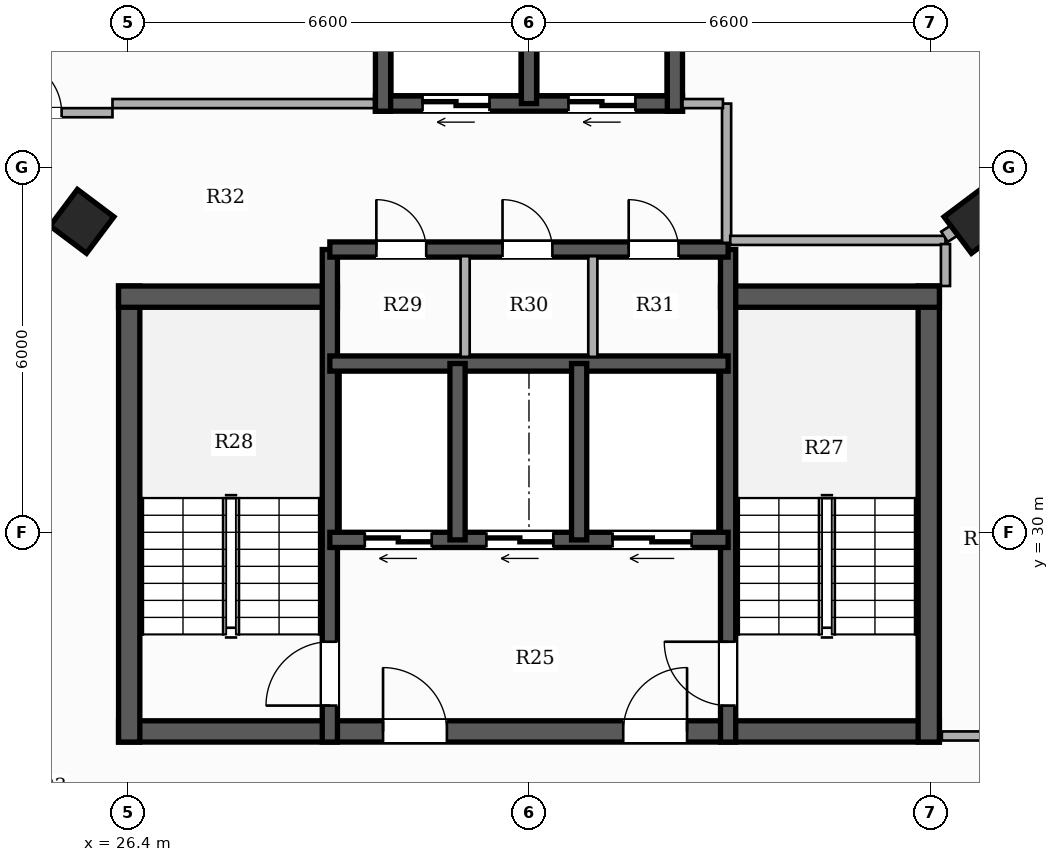
"""IFC4 building model, lengths in metres.
Left out: names, types, materials, properties, quantities, classifications, styles, units other than length and angle.
Written with IfcOpenShell. Run it as: python <this file> out.ifc"""

import sys

from ifc_helpers import new_model, si_unit, direction, frame, frame_2d, origin, origin_2d, place, context, subcontext, project, spatial, rectangle, hollow_rectangle, extrude, element, fill, save


model = new_model("IFC4")
c1 = context("Model", 3, precision=1e-05, world=origin(), true_north=direction((0.0, 1.0)))
c2 = subcontext(c1, "Body", "Model", "MODEL_VIEW")
j1 = project(units=[si_unit("LENGTHUNIT", "METRE"), si_unit("PLANEANGLEUNIT", "RADIAN")], contexts=[c1])
p1 = place(None, origin())
s1 = spatial("IfcSite", under=j1, at=p1, CompositionType="ELEMENT")
p2 = place(p1, origin())
s2 = spatial("IfcBuilding", under=s1, at=p2, CompositionType="ELEMENT")
p3 = place(p2, frame((0.0, 0.0, 209.6)))
s3 = spatial("IfcBuildingStorey", under=s2, at=p3, CompositionType="ELEMENT", Elevation=209.6)
p4 = place(p3, frame((26.25, 26.725, 0.0), z_axis=(0.0, 0.0, 1.0), x_axis=(1.0, 0.0, 0.0)))
e1 = element("IfcWall", 1, at=p4, inside=s3, PredefinedType="SHEAR", context=c2, shape_type="SweptSolid", body=[
    extrude(rectangle(XDim=13.5, YDim=0.35, at=frame_2d((6.75, 0.0))), origin(), (0.0, 0.0, 1.0), 3.3),
])
p5 = place(p4, frame((4.35, 0.0, 0.0)))
e2 = element("IfcOpeningElement", 2, at=p5, cuts=e1, PredefinedType="OPENING", context=c2, shape_type="SweptSolid", body=[
    extrude(rectangle(XDim=1.05, YDim=2.15, at=frame_2d((0.525, 1.075))), frame((0.0, 0.185, 0.0), z_axis=(0.0, -1.0, 0.0), x_axis=(1.0, 0.0, 0.0)), (0.0, 0.0, 1.0), 0.37),
])
p6 = place(p4, frame((8.3, 0.0, 0.0)))
e3 = element("IfcOpeningElement", 3, at=p6, cuts=e1, PredefinedType="OPENING", context=c2, shape_type="SweptSolid", body=[
    extrude(rectangle(XDim=1.05, YDim=2.15, at=frame_2d((0.525, 1.075))), frame((0.0, 0.185, 0.0), z_axis=(0.0, -1.0, 0.0), x_axis=(1.0, 0.0, 0.0)), (0.0, 0.0, 1.0), 0.37),
])
p7 = place(p3, frame((26.425, 26.55, 0.0), z_axis=(0.0, 0.0, 1.0), x_axis=(0.0, 1.0, 0.0)))
e4 = element("IfcWall", 4, at=p7, inside=s3, PredefinedType="SHEAR", context=c2, shape_type="SweptSolid", body=[
    extrude(rectangle(XDim=7.5, YDim=0.35, at=frame_2d((3.75, 0.0))), origin(), (0.0, 0.0, 1.0), 3.3),
])
p8 = place(p3, frame((26.25, 33.875, 0.0), z_axis=(0.0, 0.0, 1.0), x_axis=(1.0, 0.0, 0.0)))
e5 = element("IfcWall", 5, at=p8, inside=s3, PredefinedType="SHEAR", context=c2, shape_type="SweptSolid", body=[
    extrude(rectangle(XDim=3.6, YDim=0.35, at=frame_2d((1.8, 0.0))), origin(), (0.0, 0.0, 1.0), 3.3),
])
p9 = place(p3, frame((39.575, 26.55, 0.0), z_axis=(0.0, 0.0, 1.0), x_axis=(0.0, 1.0, 0.0)))
e6 = element("IfcWall", 6, at=p9, inside=s3, PredefinedType="SHEAR", context=c2, shape_type="SweptSolid", body=[
    extrude(rectangle(XDim=7.5, YDim=0.35, at=frame_2d((3.75, 0.0))), origin(), (0.0, 0.0, 1.0), 3.3),
])
p10 = place(p3, frame((36.15, 33.875, 0.0), z_axis=(0.0, 0.0, 1.0), x_axis=(1.0, 0.0, 0.0)))
e7 = element("IfcWall", 7, at=p10, inside=s3, PredefinedType="SHEAR", context=c2, shape_type="SweptSolid", body=[
    extrude(rectangle(XDim=3.6, YDim=0.35, at=frame_2d((1.8, 0.0))), origin(), (0.0, 0.0, 1.0), 3.3),
])
p11 = place(p3, frame((29.725, 26.55, 0.0), z_axis=(0.0, 0.0, 1.0), x_axis=(0.0, 1.0, 0.0)))
e8 = element("IfcWall", 8, at=p11, inside=s3, PredefinedType="SHEAR", context=c2, shape_type="SweptSolid", body=[
    extrude(rectangle(XDim=8.1, YDim=0.25, at=frame_2d((4.05, 0.0))), origin(), (0.0, 0.0, 1.0), 3.3),
])
p12 = place(p11, frame((0.6, 0.0, 0.0)))
e9 = element("IfcOpeningElement", 9, at=p12, cuts=e8, PredefinedType="OPENING", context=c2, shape_type="SweptSolid", body=[
    extrude(rectangle(XDim=1.05, YDim=2.15, at=frame_2d((0.525, 1.075))), frame((0.0, 0.135, 0.0), z_axis=(0.0, -1.0, 0.0), x_axis=(1.0, 0.0, 0.0)), (0.0, 0.0, 1.0), 0.27),
])
p13 = place(p3, frame((36.275, 26.55, 0.0), z_axis=(0.0, 0.0, 1.0), x_axis=(0.0, 1.0, 0.0)))
e10 = element("IfcWall", 10, at=p13, inside=s3, PredefinedType="SHEAR", context=c2, shape_type="SweptSolid", body=[
    extrude(rectangle(XDim=8.1, YDim=0.25, at=frame_2d((4.05, 0.0))), origin(), (0.0, 0.0, 1.0), 3.3),
])
p14 = place(p13, frame((0.6, 0.0, 0.0)))
e11 = element("IfcOpeningElement", 11, at=p14, cuts=e10, PredefinedType="OPENING", context=c2, shape_type="SweptSolid", body=[
    extrude(rectangle(XDim=1.05, YDim=2.15, at=frame_2d((0.525, 1.075))), frame((0.0, 0.135, 0.0), z_axis=(0.0, -1.0, 0.0), x_axis=(1.0, 0.0, 0.0)), (0.0, 0.0, 1.0), 0.27),
])
p15 = place(p3, frame((36.275, 29.875, 0.0), z_axis=(0.0, 0.0, 1.0), x_axis=(-1.0, 0.0, 0.0)))
e12 = element("IfcWall", 12, at=p15, inside=s3, PredefinedType="SHEAR", context=c2, shape_type="SweptSolid", body=[
    extrude(rectangle(XDim=6.55, YDim=0.25, at=frame_2d((3.275, 0.0))), origin(), (0.0, 0.0, 1.0), 3.3),
])
p16 = place(p15, frame((4.875, 0.0, 0.0)))
e13 = element("IfcOpeningElement", 13, at=p16, cuts=e12, PredefinedType="OPENING", context=c2, shape_type="SweptSolid", body=[
    extrude(rectangle(XDim=1.1, YDim=2.2, at=frame_2d((0.55, 1.1))), frame((0.0, 0.135, 0.0), z_axis=(0.0, -1.0, 0.0), x_axis=(1.0, 0.0, 0.0)), (0.0, 0.0, 1.0), 0.27),
])
p17 = place(p15, frame((2.875, 0.0, 0.0)))
e14 = element("IfcOpeningElement", 14, at=p17, cuts=e12, PredefinedType="OPENING", context=c2, shape_type="SweptSolid", body=[
    extrude(rectangle(XDim=1.1, YDim=2.2, at=frame_2d((0.55, 1.1))), frame((0.0, 0.135, 0.0), z_axis=(0.0, -1.0, 0.0), x_axis=(1.0, 0.0, 0.0)), (0.0, 0.0, 1.0), 0.27),
])
p18 = place(p15, frame((0.6, 0.0, 0.0)))
e15 = element("IfcOpeningElement", 15, at=p18, cuts=e12, PredefinedType="OPENING", context=c2, shape_type="SweptSolid", body=[
    extrude(rectangle(XDim=1.3, YDim=2.2, at=frame_2d((0.65, 1.1))), frame((0.0, 0.135, 0.0), z_axis=(0.0, -1.0, 0.0), x_axis=(1.0, 0.0, 0.0)), (0.0, 0.0, 1.0), 0.27),
])
p19 = place(p3, frame((29.725, 32.775, 0.0), z_axis=(0.0, 0.0, 1.0), x_axis=(1.0, 0.0, 0.0)))
e16 = element("IfcWall", 16, at=p19, inside=s3, PredefinedType="SHEAR", context=c2, shape_type="SweptSolid", body=[
    extrude(rectangle(XDim=6.55, YDim=0.25, at=frame_2d((3.275, 0.0))), origin(), (0.0, 0.0, 1.0), 3.3),
])
for number, where, z_axis, x_axis in (
    (17, (31.825, 29.875, 0.0), (0.0, 0.0, 1.0), (0.0, 1.0, 0.0)),
    (18, (33.825, 29.875, 0.0), (0.0, 0.0, 1.0), (0.0, 1.0, 0.0)),
):
    element("IfcWall", number, at=place(p3, frame(where, z_axis=z_axis, x_axis=x_axis)), inside=s3, PredefinedType="SHEAR", context=c2, shape_type="SweptSolid", body=[
        extrude(rectangle(XDim=2.9, YDim=0.25, at=frame_2d((1.45, 0.0))), origin(), (0.0, 0.0, 1.0), 3.3),
    ])
p20 = place(p3, frame((29.725, 34.65, 0.0), z_axis=(0.0, 0.0, 1.0), x_axis=(1.0, 0.0, 0.0)))
e19 = element("IfcWall", 19, at=p20, inside=s3, PredefinedType="SHEAR", context=c2, shape_type="SweptSolid", body=[
    extrude(rectangle(XDim=6.55, YDim=0.25, at=frame_2d((3.275, 0.0))), origin(), (0.0, 0.0, 1.0), 3.3),
])
p21 = place(p20, frame((0.765, 0.0, 0.0)))
e20 = element("IfcOpeningElement", 20, at=p21, cuts=e19, PredefinedType="OPENING", context=c2, shape_type="SweptSolid", body=[
    extrude(rectangle(XDim=0.82, YDim=2.1, at=frame_2d((0.41, 1.05))), frame((0.0, 0.135, 0.0), z_axis=(0.0, -1.0, 0.0), x_axis=(1.0, 0.0, 0.0)), (0.0, 0.0, 1.0), 0.27),
])
p22 = place(p20, frame((2.84, 0.0, 0.0)))
e21 = element("IfcOpeningElement", 21, at=p22, cuts=e19, PredefinedType="OPENING", context=c2, shape_type="SweptSolid", body=[
    extrude(rectangle(XDim=0.82, YDim=2.1, at=frame_2d((0.41, 1.05))), frame((0.0, 0.135, 0.0), z_axis=(0.0, -1.0, 0.0), x_axis=(1.0, 0.0, 0.0)), (0.0, 0.0, 1.0), 0.27),
])
p23 = place(p20, frame((4.915, 0.0, 0.0)))
e22 = element("IfcOpeningElement", 22, at=p23, cuts=e19, PredefinedType="OPENING", context=c2, shape_type="SweptSolid", body=[
    extrude(rectangle(XDim=0.82, YDim=2.1, at=frame_2d((0.41, 1.05))), frame((0.0, 0.135, 0.0), z_axis=(0.0, -1.0, 0.0), x_axis=(1.0, 0.0, 0.0)), (0.0, 0.0, 1.0), 0.27),
])
p24 = place(p3, frame((35.525, 37.05, 0.0), z_axis=(0.0, 0.0, 1.0), x_axis=(-1.0, 0.0, 0.0)))
e23 = element("IfcWall", 23, at=p24, inside=s3, PredefinedType="SHEAR", context=c2, shape_type="SweptSolid", body=[
    extrude(rectangle(XDim=5.05, YDim=0.25, at=frame_2d((2.525, 0.0))), origin(), (0.0, 0.0, 1.0), 3.3),
])
p25 = place(p24, frame((3.175, 0.0, 0.0)))
e24 = element("IfcOpeningElement", 24, at=p25, cuts=e23, PredefinedType="OPENING", context=c2, shape_type="SweptSolid", body=[
    extrude(rectangle(XDim=1.1, YDim=2.2, at=frame_2d((0.55, 1.1))), frame((0.0, 0.135, 0.0), z_axis=(0.0, -1.0, 0.0), x_axis=(1.0, 0.0, 0.0)), (0.0, 0.0, 1.0), 0.27),
])
p26 = place(p24, frame((0.775, 0.0, 0.0)))
e25 = element("IfcOpeningElement", 25, at=p26, cuts=e23, PredefinedType="OPENING", context=c2, shape_type="SweptSolid", body=[
    extrude(rectangle(XDim=1.1, YDim=2.2, at=frame_2d((0.55, 1.1))), frame((0.0, 0.135, 0.0), z_axis=(0.0, -1.0, 0.0), x_axis=(1.0, 0.0, 0.0)), (0.0, 0.0, 1.0), 0.27),
])
for number, where, z_axis, x_axis in (
    (26, (30.6, 36.925, 0.0), (0.0, 0.0, 1.0), (0.0, 1.0, 0.0)),
    (27, (35.4, 36.925, 0.0), (0.0, 0.0, 1.0), (0.0, 1.0, 0.0)),
):
    element("IfcWall", number, at=place(p3, frame(where, z_axis=z_axis, x_axis=x_axis)), inside=s3, PredefinedType="SHEAR", context=c2, shape_type="SweptSolid", body=[
        extrude(rectangle(XDim=2.8, YDim=0.25, at=frame_2d((1.4, 0.0))), origin(), (0.0, 0.0, 1.0), 3.3),
    ])
p27 = place(p3, frame((33.0, 37.05, 0.0), z_axis=(0.0, 0.0, 1.0), x_axis=(0.0, 1.0, 0.0)))
e28 = element("IfcWall", 28, at=p27, inside=s3, PredefinedType="SHEAR", context=c2, shape_type="SweptSolid", body=[
    extrude(rectangle(XDim=2.55, YDim=0.25, at=frame_2d((1.275, 0.0))), origin(), (0.0, 0.0, 1.0), 3.3),
])
for number, where, z_axis, x_axis in (
    (29, (25.648, 35.113, 0.0), (0.0, 0.0, 1.0), (0.6, 0.8, 0.0)),
    (30, (40.352, 35.113, 0.0), (0.0, 0.0, 1.0), (-0.6, 0.8, 0.0)),
):
    element("IfcColumn", number, at=place(p3, frame(where, z_axis=z_axis, x_axis=x_axis)), inside=s3, PredefinedType="COLUMN", context=c2, shape_type="SweptSolid", body=[
        extrude(hollow_rectangle(XDim=0.75, YDim=0.75, WallThickness=0.025, at=origin_2d()), origin(), (0.0, 0.0, 1.0), 3.3),
    ])
p28 = place(p3, frame((36.25, 34.76, 0.0), z_axis=(0.0, 0.0, 1.0), x_axis=(0.0, 1.0, 0.0)))
e31 = element("IfcWall", 31, at=p28, inside=s3, PredefinedType="PARTITIONING", context=c2, shape_type="SweptSolid", body=[
    extrude(rectangle(XDim=2.29, YDim=0.15, at=frame_2d((1.145, 0.0))), origin(), (0.0, 0.0, 1.0), 2.425),
])
p29 = place(p3, frame((35.525, 37.05, 0.0), z_axis=(0.0, 0.0, 1.0), x_axis=(1.0, 0.0, 0.0)))
e32 = element("IfcWall", 32, at=p29, inside=s3, PredefinedType="PARTITIONING", context=c2, shape_type="SweptSolid", body=[
    extrude(rectangle(XDim=0.665, YDim=0.15, at=frame_2d((0.333, 0.0))), origin(), (0.0, 0.0, 1.0), 2.425),
])
for number, where, z_axis, x_axis in (
    (33, (31.95, 32.885, 0.0), (0.0, 0.0, 1.0), (0.0, 1.0, 0.0)),
    (34, (34.05, 32.885, 0.0), (0.0, 0.0, 1.0), (0.0, 1.0, 0.0)),
):
    element("IfcWall", number, at=place(p3, frame(where, z_axis=z_axis, x_axis=x_axis)), inside=s3, PredefinedType="PARTITIONING", context=c2, shape_type="SweptSolid", body=[
        extrude(rectangle(XDim=1.655, YDim=0.15, at=frame_2d((0.828, 0.0))), origin(), (0.0, 0.0, 1.0), 3.06),
    ])
p30 = place(p3, frame((24.028, 36.9, 0.0), z_axis=(0.0, 0.0, 1.0), x_axis=(1.0, 0.0, 0.0)))
e35 = element("IfcWall", 35, at=p30, inside=s3, PredefinedType="PARTITIONING", context=c2, shape_type="SweptSolid", body=[
    extrude(rectangle(XDim=2.122, YDim=0.15, at=frame_2d((1.061, 0.0))), origin(), (0.0, 0.0, 1.0), 2.619),
])
p31 = place(p30, frame((0.406, 0.0, 0.0)))
e36 = element("IfcOpeningElement", 36, at=p31, cuts=e35, PredefinedType="OPENING", context=c2, shape_type="SweptSolid", body=[
    extrude(rectangle(XDim=0.88, YDim=2.1, at=frame_2d((0.44, 1.05))), frame((0.0, 0.085, 0.0), z_axis=(0.0, -1.0, 0.0), x_axis=(1.0, 0.0, 0.0)), (0.0, 0.0, 1.0), 0.17),
])
p32 = place(p3, frame((39.79, 26.65, 0.0), z_axis=(0.0, 0.0, 1.0), x_axis=(1.0, 0.0, 0.0)))
e37 = element("IfcWall", 37, at=p32, inside=s3, PredefinedType="PARTITIONING", context=c2, shape_type="SweptSolid", body=[
    extrude(rectangle(XDim=2.46, YDim=0.15, at=frame_2d((1.23, 0.0))), origin(), (0.0, 0.0, 1.0), 2.565),
])
p33 = place(p32, frame((0.79, 0.0, 0.0)))
e38 = element("IfcOpeningElement", 38, at=p33, cuts=e37, PredefinedType="OPENING", context=c2, shape_type="SweptSolid", body=[
    extrude(rectangle(XDim=0.88, YDim=2.1, at=frame_2d((0.44, 1.05))), frame((0.0, 0.085, 0.0), z_axis=(0.0, -1.0, 0.0), x_axis=(1.0, 0.0, 0.0)), (0.0, 0.0, 1.0), 0.17),
])
p34 = place(p3, frame((26.15, 37.05, 0.0), z_axis=(0.0, 0.0, 1.0), x_axis=(1.0, 0.0, 0.0)))
e39 = element("IfcWall", 39, at=p34, inside=s3, PredefinedType="PARTITIONING", context=c2, shape_type="SweptSolid", body=[
    extrude(rectangle(XDim=4.3, YDim=0.15, at=frame_2d((2.15, 0.0))), origin(), (0.0, 0.0, 1.0), 2.425),
])
p35 = place(p3, frame((36.31, 34.8, 0.0), z_axis=(0.0, 0.0, 1.0), x_axis=(1.0, 0.0, 0.0)))
e40 = element("IfcWall", 40, at=p35, inside=s3, PredefinedType="PARTITIONING", context=c2, shape_type="SweptSolid", body=[
    extrude(rectangle(XDim=3.54, YDim=0.15, at=frame_2d((1.77, 0.0))), origin(), (0.0, 0.0, 1.0), 2.425),
])
p36 = place(p3, frame((39.85, 34.74, 0.0), z_axis=(0.0, 0.0, 1.0), x_axis=(0.0, -1.0, 0.0)))
e41 = element("IfcWall", 41, at=p36, inside=s3, PredefinedType="PARTITIONING", context=c2, shape_type="SweptSolid", body=[
    extrude(rectangle(XDim=0.69, YDim=0.15, at=frame_2d((0.345, 0.0))), origin(), (0.0, 0.0, 1.0), 2.773),
])
p37 = place(p3, frame((39.833, 34.86, 0.0), z_axis=(0.0, 0.0, 1.0), x_axis=(0.842993506682, 0.537923737803, 0.0)))
e42 = element("IfcWall", 42, at=p37, inside=s3, PredefinedType="PARTITIONING", context=c2, shape_type="SweptSolid", body=[
    extrude(rectangle(XDim=2.907, YDim=0.2, at=frame_2d((1.454, 0.0))), origin(), (0.0, 0.0, 1.0), 2.492),
])
p38 = place(p12, origin())
e43 = element("IfcDoor", 43, at=p38, inside=s3, OperationType="SINGLE_SWING_LEFT", PredefinedType="DOOR", context=c2, shape_type="SweptSolid", body=[
    extrude(rectangle(XDim=1.05, YDim=2.15, at=frame_2d((0.525, 1.075))), frame((0.0, 0.025, 0.0), z_axis=(0.0, -1.0, 0.0), x_axis=(1.0, 0.0, 0.0)), (0.0, 0.0, 1.0), 0.05),
])
fill(e9, e43)
p39 = place(p14, origin())
e44 = element("IfcDoor", 44, at=p39, inside=s3, OperationType="SINGLE_SWING_RIGHT", PredefinedType="DOOR", context=c2, shape_type="SweptSolid", body=[
    extrude(rectangle(XDim=1.05, YDim=2.15, at=frame_2d((0.525, 1.075))), frame((0.0, 0.025, 0.0), z_axis=(0.0, -1.0, 0.0), x_axis=(1.0, 0.0, 0.0)), (0.0, 0.0, 1.0), 0.05),
])
fill(e11, e44)
p40 = place(p5, origin())
e45 = element("IfcDoor", 45, at=p40, inside=s3, OperationType="SINGLE_SWING_LEFT", PredefinedType="DOOR", context=c2, shape_type="SweptSolid", body=[
    extrude(rectangle(XDim=1.05, YDim=2.15, at=frame_2d((0.525, 1.075))), frame((0.0, 0.025, 0.0), z_axis=(0.0, -1.0, 0.0), x_axis=(1.0, 0.0, 0.0)), (0.0, 0.0, 1.0), 0.05),
])
fill(e2, e45)
p41 = place(p6, origin())
e46 = element("IfcDoor", 46, at=p41, inside=s3, OperationType="SINGLE_SWING_RIGHT", PredefinedType="DOOR", context=c2, shape_type="SweptSolid", body=[
    extrude(rectangle(XDim=1.05, YDim=2.15, at=frame_2d((0.525, 1.075))), frame((0.0, 0.025, 0.0), z_axis=(0.0, -1.0, 0.0), x_axis=(1.0, 0.0, 0.0)), (0.0, 0.0, 1.0), 0.05),
])
fill(e3, e46)
p42 = place(p16, origin())
e47 = element("IfcDoor", 47, at=p42, inside=s3, OperationType="DOUBLE_DOOR_SLIDING", PredefinedType="DOOR", context=c2, shape_type="SweptSolid", body=[
    extrude(rectangle(XDim=1.1, YDim=2.2, at=frame_2d((0.55, 1.1))), frame((0.0, 0.025, 0.0), z_axis=(0.0, -1.0, 0.0), x_axis=(1.0, 0.0, 0.0)), (0.0, 0.0, 1.0), 0.05),
])
fill(e13, e47)
p43 = place(p17, origin())
e48 = element("IfcDoor", 48, at=p43, inside=s3, OperationType="DOUBLE_DOOR_SLIDING", PredefinedType="DOOR", context=c2, shape_type="SweptSolid", body=[
    extrude(rectangle(XDim=1.1, YDim=2.2, at=frame_2d((0.55, 1.1))), frame((0.0, 0.025, 0.0), z_axis=(0.0, -1.0, 0.0), x_axis=(1.0, 0.0, 0.0)), (0.0, 0.0, 1.0), 0.05),
])
fill(e14, e48)
p44 = place(p18, origin())
e49 = element("IfcDoor", 49, at=p44, inside=s3, OperationType="DOUBLE_DOOR_SLIDING", PredefinedType="DOOR", context=c2, shape_type="SweptSolid", body=[
    extrude(rectangle(XDim=1.3, YDim=2.2, at=frame_2d((0.65, 1.1))), frame((0.0, 0.025, 0.0), z_axis=(0.0, -1.0, 0.0), x_axis=(1.0, 0.0, 0.0)), (0.0, 0.0, 1.0), 0.05),
])
fill(e15, e49)
p45 = place(p25, origin())
e50 = element("IfcDoor", 50, at=p45, inside=s3, OperationType="DOUBLE_DOOR_SLIDING", PredefinedType="DOOR", context=c2, shape_type="SweptSolid", body=[
    extrude(rectangle(XDim=1.1, YDim=2.2, at=frame_2d((0.55, 1.1))), frame((0.0, 0.025, 0.0), z_axis=(0.0, -1.0, 0.0), x_axis=(1.0, 0.0, 0.0)), (0.0, 0.0, 1.0), 0.05),
])
fill(e24, e50)
p46 = place(p26, origin())
e51 = element("IfcDoor", 51, at=p46, inside=s3, OperationType="DOUBLE_DOOR_SLIDING", PredefinedType="DOOR", context=c2, shape_type="SweptSolid", body=[
    extrude(rectangle(XDim=1.1, YDim=2.2, at=frame_2d((0.55, 1.1))), frame((0.0, 0.025, 0.0), z_axis=(0.0, -1.0, 0.0), x_axis=(1.0, 0.0, 0.0)), (0.0, 0.0, 1.0), 0.05),
])
fill(e25, e51)
p47 = place(p21, origin())
e52 = element("IfcDoor", 52, at=p47, inside=s3, OperationType="SINGLE_SWING_LEFT", PredefinedType="DOOR", context=c2, shape_type="SweptSolid", body=[
    extrude(rectangle(XDim=0.82, YDim=2.1, at=frame_2d((0.41, 1.05))), frame((0.0, 0.025, 0.0), z_axis=(0.0, -1.0, 0.0), x_axis=(1.0, 0.0, 0.0)), (0.0, 0.0, 1.0), 0.05),
])
fill(e20, e52)
p48 = place(p22, origin())
e53 = element("IfcDoor", 53, at=p48, inside=s3, OperationType="SINGLE_SWING_LEFT", PredefinedType="DOOR", context=c2, shape_type="SweptSolid", body=[
    extrude(rectangle(XDim=0.82, YDim=2.1, at=frame_2d((0.41, 1.05))), frame((0.0, 0.025, 0.0), z_axis=(0.0, -1.0, 0.0), x_axis=(1.0, 0.0, 0.0)), (0.0, 0.0, 1.0), 0.05),
])
fill(e21, e53)
p49 = place(p23, origin())
e54 = element("IfcDoor", 54, at=p49, inside=s3, OperationType="SINGLE_SWING_LEFT", PredefinedType="DOOR", context=c2, shape_type="SweptSolid", body=[
    extrude(rectangle(XDim=0.82, YDim=2.1, at=frame_2d((0.41, 1.05))), frame((0.0, 0.025, 0.0), z_axis=(0.0, -1.0, 0.0), x_axis=(1.0, 0.0, 0.0)), (0.0, 0.0, 1.0), 0.05),
])
fill(e22, e54)
p50 = place(p31, origin())
e55 = element("IfcDoor", 55, at=p50, inside=s3, OperationType="SINGLE_SWING_LEFT", PredefinedType="DOOR", context=c2, shape_type="SweptSolid", body=[
    extrude(rectangle(XDim=0.88, YDim=2.1, at=frame_2d((0.44, 1.05))), frame((0.0, 0.025, 0.0), z_axis=(0.0, -1.0, 0.0), x_axis=(1.0, 0.0, 0.0)), (0.0, 0.0, 1.0), 0.05),
])
fill(e36, e55)
save(model, sys.argv[1])
